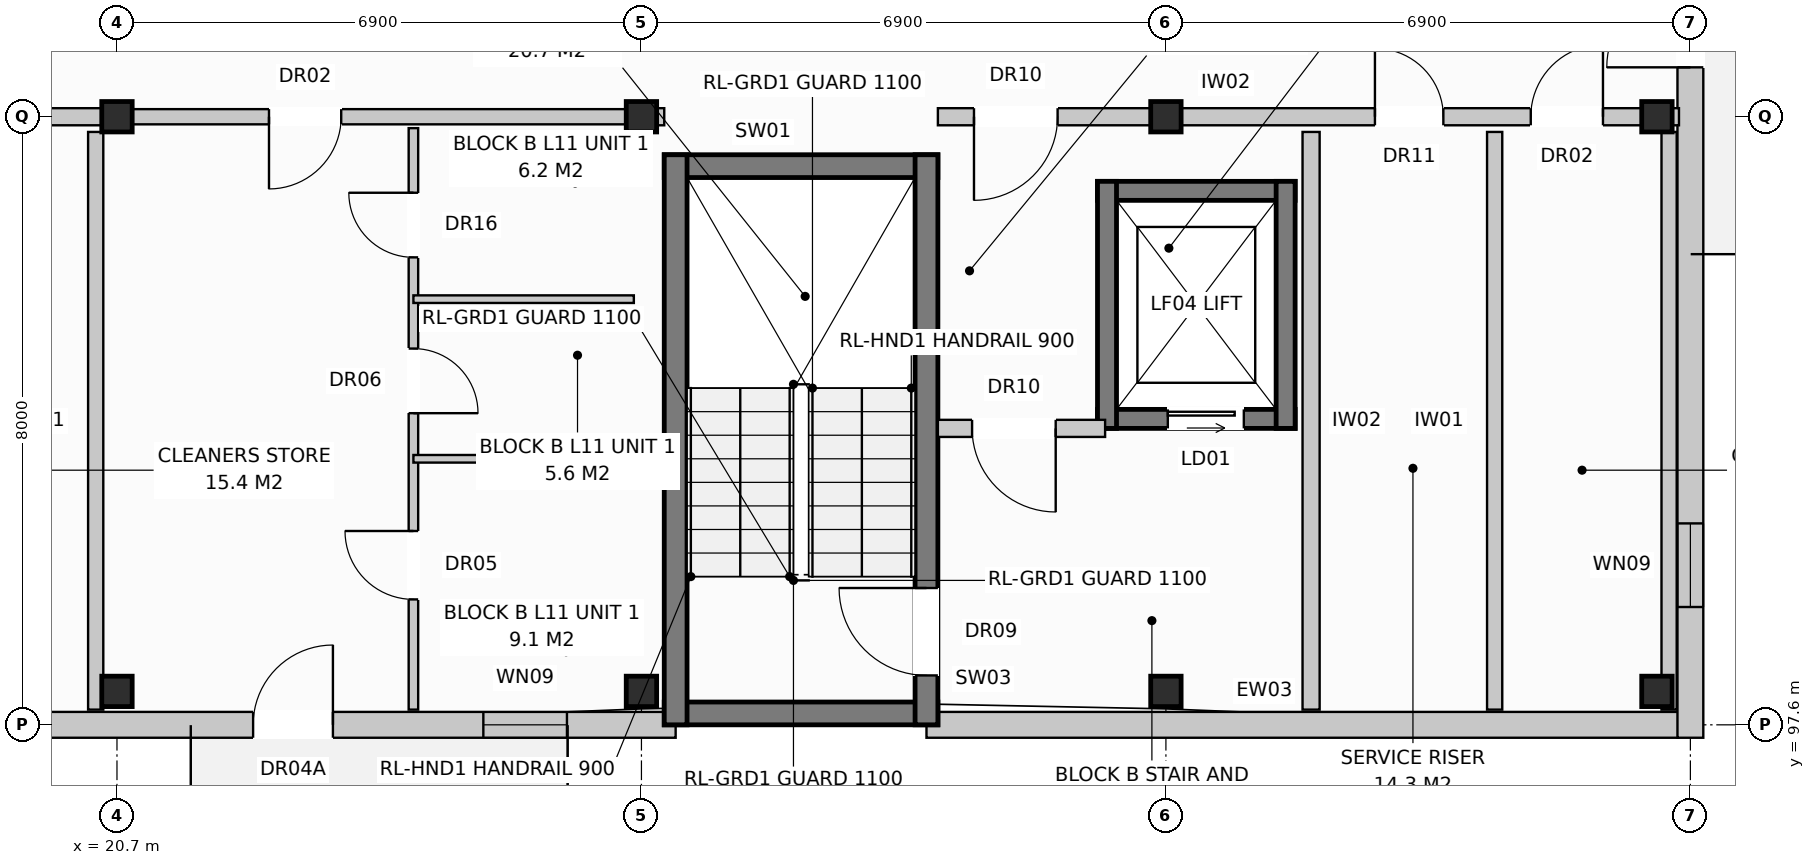
"""IFC4 building model, lengths in metres.
Left out: names, types, materials, properties, quantities, classifications, styles, units other than length and angle.
Written with IfcOpenShell. Run it as: python <this file> out.ifc"""

import sys

from ifc_helpers import new_model, si_unit, direction, frame, frame_2d, origin, origin_with_axes, origin_2d, place, context, subcontext, project, spatial, rectangle, extrude, element, fill, save


model = new_model("IFC4")
c1 = context("Model", 3, precision=1e-05, world=origin(), true_north=direction((0.0, 1.0)))
c2 = subcontext(c1, "Body", "Model", "MODEL_VIEW")
j1 = project(units=[si_unit("LENGTHUNIT", "METRE"), si_unit("PLANEANGLEUNIT", "RADIAN")], contexts=[c1])
p1 = place(None, origin())
s1 = spatial("IfcSite", under=j1, at=p1, CompositionType="ELEMENT")
p2 = place(p1, origin())
s2 = spatial("IfcBuilding", under=s1, at=p2, CompositionType="ELEMENT")
p3 = place(p2, frame((0.0, 0.0, 36.8)))
s3 = spatial("IfcBuildingStorey", under=s2, at=p3, CompositionType="ELEMENT", Elevation=36.8)
for number, where, z_axis, x_axis in (
    (1, (20.7, 98.04, 0.0), (0.0, 0.0, 1.0), (1.0, 0.0, 0.0)),
    (2, (20.7, 105.6, 0.0), (0.0, 0.0, 1.0), (1.0, 0.0, 0.0)),
    (3, (27.6, 98.04, 0.0), (0.0, 0.0, 1.0), (1.0, 0.0, 0.0)),
    (4, (27.6, 105.6, 0.0), (0.0, 0.0, 1.0), (1.0, 0.0, 0.0)),
    (5, (34.5, 98.04, 0.0), (0.0, 0.0, 1.0), (1.0, 0.0, 0.0)),
    (6, (34.5, 105.6, 0.0), (0.0, 0.0, 1.0), (1.0, 0.0, 0.0)),
    (7, (40.96, 98.04, 0.0), (0.0, 0.0, 1.0), (1.0, 0.0, 0.0)),
    (8, (40.96, 105.6, 0.0), (0.0, 0.0, 1.0), (1.0, 0.0, 0.0)),
):
    element("IfcColumn", number, at=place(p3, frame(where, z_axis=z_axis, x_axis=x_axis)), inside=s3, PredefinedType="COLUMN", context=c2, shape_type="SweptSolid", body=[
        extrude(rectangle(XDim=0.4, YDim=0.4, at=origin_2d()), origin(), (0.0, 0.0, 1.0), 3.2),
    ])
p4 = place(p3, frame((10.65, 97.6, 0.0), z_axis=(0.0, 0.0, 1.0), x_axis=(1.0, 0.0, 0.0)))
e9 = element("IfcWall", 9, at=p4, inside=s3, PredefinedType="STANDARD", context=c2, shape_type="SweptSolid", body=[
    extrude(rectangle(XDim=17.4, YDim=0.34, at=frame_2d((8.7, 0.0))), origin(), (0.0, 0.0, 1.0), 2.97),
])
p5 = place(p4, frame((11.841, 0.0, 0.0)))
e10 = element("IfcOpeningElement", 10, at=p5, cuts=e9, PredefinedType="OPENING", context=c2, shape_type="SweptSolid", body=[
    extrude(rectangle(XDim=1.05, YDim=2.12, at=frame_2d((0.525, 1.06))), frame((0.0, 0.182, 0.0), z_axis=(0.0, -1.0, 0.0), x_axis=(1.0, 0.0, 0.0)), (0.0, 0.0, 1.0), 0.364),
])
p6 = place(p4, frame((14.87, 0.0, 0.72)))
e11 = element("IfcOpeningElement", 11, at=p6, cuts=e9, PredefinedType="OPENING", context=c2, shape_type="SweptSolid", body=[
    extrude(rectangle(XDim=1.1, YDim=1.5, at=frame_2d((0.55, 0.75))), frame((0.0, 0.182, 0.0), z_axis=(0.0, -1.0, 0.0), x_axis=(1.0, 0.0, 0.0)), (0.0, 0.0, 1.0), 0.364),
])
p7 = place(p3, frame((31.35, 97.6, 0.0), z_axis=(0.0, 0.0, 1.0), x_axis=(1.0, 0.0, 0.0)))
e12 = element("IfcWall", 12, at=p7, inside=s3, PredefinedType="STANDARD", context=c2, shape_type="SweptSolid", body=[
    extrude(rectangle(XDim=9.89, YDim=0.34, at=frame_2d((4.945, 0.0))), origin(), (0.0, 0.0, 1.0), 2.97),
])
p8 = place(p3, frame((41.4, 97.43, 0.0), z_axis=(0.0, 0.0, 1.0), x_axis=(0.0, 1.0, 0.0)))
e13 = element("IfcWall", 13, at=p8, inside=s3, PredefinedType="STANDARD", context=c2, shape_type="SweptSolid", body=[
    extrude(rectangle(XDim=18.74, YDim=0.34, at=frame_2d((9.37, 0.0))), origin(), (0.0, 0.0, 1.0), 2.97),
])
p9 = place(p8, frame((8.82, 0.0, 0.0)))
e14 = element("IfcOpeningElement", 14, at=p9, cuts=e13, PredefinedType="OPENING", context=c2, shape_type="SweptSolid", body=[
    extrude(rectangle(XDim=1.1, YDim=2.1, at=frame_2d((0.55, 1.05))), frame((0.0, 0.182, 0.0), z_axis=(0.0, -1.0, 0.0), x_axis=(1.0, 0.0, 0.0)), (0.0, 0.0, 1.0), 0.364),
])
p10 = place(p8, frame((1.72, 0.0, 0.72)))
e15 = element("IfcOpeningElement", 15, at=p10, cuts=e13, PredefinedType="OPENING", context=c2, shape_type="SweptSolid", body=[
    extrude(rectangle(XDim=1.1, YDim=1.5, at=frame_2d((0.55, 0.75))), frame((0.0, 0.182, 0.0), z_axis=(0.0, -1.0, 0.0), x_axis=(1.0, 0.0, 0.0)), (0.0, 0.0, 1.0), 0.364),
])
p11 = place(p8, frame((15.92, 0.0, 0.72)))
e16 = element("IfcOpeningElement", 16, at=p11, cuts=e13, PredefinedType="OPENING", context=c2, shape_type="SweptSolid", body=[
    extrude(rectangle(XDim=1.1, YDim=1.5, at=frame_2d((0.55, 0.75))), frame((0.0, 0.182, 0.0), z_axis=(0.0, -1.0, 0.0), x_axis=(1.0, 0.0, 0.0)), (0.0, 0.0, 1.0), 0.364),
])
p12 = place(p3, frame((20.42, 97.8, 0.0), z_axis=(0.0, 0.0, 1.0), x_axis=(0.0, 1.0, 0.0)))
e17 = element("IfcWall", 17, at=p12, inside=s3, PredefinedType="PARTITIONING", context=c2, shape_type="SweptSolid", body=[
    extrude(rectangle(XDim=7.6, YDim=0.2, at=frame_2d((3.8, 0.0))), origin(), (0.0, 0.0, 1.0), 2.97),
])
p13 = place(p3, frame((10.8, 105.6, 0.0), z_axis=(0.0, 0.0, 1.0), x_axis=(1.0, 0.0, 0.0)))
e18 = element("IfcWall", 18, at=p13, inside=s3, PredefinedType="PARTITIONING", context=c2, shape_type="SweptSolid", body=[
    extrude(rectangle(XDim=9.9, YDim=0.225, at=frame_2d((4.95, 0.0))), origin(), (0.0, 0.0, 1.0), 2.41),
])
p14 = place(p13, frame((0.475, 0.0, 0.0)))
e19 = element("IfcOpeningElement", 19, at=p14, cuts=e18, PredefinedType="OPENING", context=c2, shape_type="SweptSolid", body=[
    extrude(rectangle(XDim=1.1, YDim=2.15, at=frame_2d((0.55, 1.075))), frame((0.0, 0.125, 0.0), z_axis=(0.0, -1.0, 0.0), x_axis=(1.0, 0.0, 0.0)), (0.0, 0.0, 1.0), 0.249),
])
p15 = place(p13, frame((5.75, 0.0, 0.0)))
e20 = element("IfcOpeningElement", 20, at=p15, cuts=e18, PredefinedType="OPENING", context=c2, shape_type="SweptSolid", body=[
    extrude(rectangle(XDim=0.9, YDim=2.1, at=frame_2d((0.45, 1.05))), frame((0.0, 0.125, 0.0), z_axis=(0.0, -1.0, 0.0), x_axis=(1.0, 0.0, 0.0)), (0.0, 0.0, 1.0), 0.249),
])
p16 = place(p13, frame((7.8, 0.0, 0.0)))
e21 = element("IfcOpeningElement", 21, at=p16, cuts=e18, PredefinedType="OPENING", context=c2, shape_type="SweptSolid", body=[
    extrude(rectangle(XDim=0.95, YDim=2.15, at=frame_2d((0.475, 1.075))), frame((0.0, 0.125, 0.0), z_axis=(0.0, -1.0, 0.0), x_axis=(1.0, 0.0, 0.0)), (0.0, 0.0, 1.0), 0.249),
])
for number, where, z_axis, x_axis in (
    (22, (27.9, 97.75, 0.0), (0.0, 0.0, 1.0), (1.0, 0.0, 0.0)),
    (23, (27.9, 104.95, 0.0), (0.0, 0.0, 1.0), (1.0, 0.0, 0.0)),
):
    element("IfcWall", number, at=place(p3, frame(where, z_axis=z_axis, x_axis=x_axis)), inside=s3, PredefinedType="SHEAR", context=c2, shape_type="SweptSolid", body=[
        extrude(rectangle(XDim=3.6, YDim=0.3, at=frame_2d((1.8, 0.0))), origin(), (0.0, 0.0, 1.0), 2.97),
    ])
p17 = place(p3, frame((28.05, 97.6, 0.0), z_axis=(0.0, 0.0, 1.0), x_axis=(0.0, 1.0, 0.0)))
e24 = element("IfcWall", 24, at=p17, inside=s3, PredefinedType="SHEAR", context=c2, shape_type="SweptSolid", body=[
    extrude(rectangle(XDim=7.5, YDim=0.3, at=frame_2d((3.75, 0.0))), origin(), (0.0, 0.0, 1.0), 2.97),
])
p18 = place(p3, frame((31.35, 97.6, 0.0), z_axis=(0.0, 0.0, 1.0), x_axis=(0.0, 1.0, 0.0)))
e25 = element("IfcWall", 25, at=p18, inside=s3, PredefinedType="SHEAR", context=c2, shape_type="SweptSolid", body=[
    extrude(rectangle(XDim=7.5, YDim=0.3, at=frame_2d((3.75, 0.0))), origin(), (0.0, 0.0, 1.0), 2.97),
])
p19 = place(p18, frame((0.65, 0.0, 0.0)))
e26 = element("IfcOpeningElement", 26, at=p19, cuts=e25, PredefinedType="OPENING", context=c2, shape_type="SweptSolid", body=[
    extrude(rectangle(XDim=1.15, YDim=2.15, at=frame_2d((0.575, 1.075))), frame((0.0, 0.162, 0.0), z_axis=(0.0, -1.0, 0.0), x_axis=(1.0, 0.0, 0.0)), (0.0, 0.0, 1.0), 0.324),
])
p20 = place(p3, frame((33.6, 101.625, 0.0), z_axis=(0.0, 0.0, 1.0), x_axis=(1.0, 0.0, 0.0)))
e27 = element("IfcWall", 27, at=p20, inside=s3, PredefinedType="SHEAR", context=c2, shape_type="SweptSolid", body=[
    extrude(rectangle(XDim=2.6, YDim=0.25, at=frame_2d((1.3, 0.0))), origin(), (0.0, 0.0, 1.0), 2.97),
])
p21 = place(p20, frame((0.925, 0.0, 0.0)))
e28 = element("IfcOpeningElement", 28, at=p21, cuts=e27, PredefinedType="OPENING", context=c2, shape_type="SweptSolid", body=[
    extrude(rectangle(XDim=1.0, YDim=2.1, at=frame_2d((0.5, 1.05))), frame((0.0, 0.137, 0.0), z_axis=(0.0, -1.0, 0.0), x_axis=(1.0, 0.0, 0.0)), (0.0, 0.0, 1.0), 0.274),
])
p22 = place(p3, frame((33.6, 104.625, 0.0), z_axis=(0.0, 0.0, 1.0), x_axis=(1.0, 0.0, 0.0)))
e29 = element("IfcWall", 29, at=p22, inside=s3, PredefinedType="SHEAR", context=c2, shape_type="SweptSolid", body=[
    extrude(rectangle(XDim=2.6, YDim=0.25, at=frame_2d((1.3, 0.0))), origin(), (0.0, 0.0, 1.0), 2.97),
])
for number, where, z_axis, x_axis in (
    (30, (33.725, 101.5, 0.0), (0.0, 0.0, 1.0), (0.0, 1.0, 0.0)),
    (31, (36.075, 101.5, 0.0), (0.0, 0.0, 1.0), (0.0, 1.0, 0.0)),
):
    element("IfcWall", number, at=place(p3, frame(where, z_axis=z_axis, x_axis=x_axis)), inside=s3, PredefinedType="SHEAR", context=c2, shape_type="SweptSolid", body=[
        extrude(rectangle(XDim=3.25, YDim=0.25, at=frame_2d((1.625, 0.0))), origin(), (0.0, 0.0, 1.0), 2.97),
    ])
p23 = place(p3, frame((36.41, 97.8, 0.0), z_axis=(0.0, 0.0, 1.0), x_axis=(0.0, 1.0, 0.0)))
e32 = element("IfcWall", 32, at=p23, inside=s3, PredefinedType="PARTITIONING", context=c2, shape_type="SweptSolid", body=[
    extrude(rectangle(XDim=7.6, YDim=0.225, at=frame_2d((3.8, 0.0))), origin(), (0.0, 0.0, 1.0), 2.97),
])
p24 = place(p3, frame((31.5, 101.5, 0.0), z_axis=(0.0, 0.0, 1.0), x_axis=(1.0, 0.0, 0.0)))
e33 = element("IfcWall", 33, at=p24, inside=s3, PredefinedType="PARTITIONING", context=c2, shape_type="SweptSolid", body=[
    extrude(rectangle(XDim=2.2, YDim=0.225, at=frame_2d((1.1, 0.0))), origin(), (0.0, 0.0, 1.0), 2.97),
])
p25 = place(p24, frame((0.45, 0.0, 0.0)))
e34 = element("IfcOpeningElement", 34, at=p25, cuts=e33, PredefinedType="OPENING", context=c2, shape_type="SweptSolid", body=[
    extrude(rectangle(XDim=1.1, YDim=2.15, at=frame_2d((0.55, 1.075))), frame((0.0, 0.125, 0.0), z_axis=(0.0, -1.0, 0.0), x_axis=(1.0, 0.0, 0.0)), (0.0, 0.0, 1.0), 0.249),
])
p26 = place(p3, frame((27.6, 105.6, 0.0), z_axis=(0.0, 0.0, 1.0), x_axis=(1.0, 0.0, 0.0)))
e35 = element("IfcWall", 35, at=p26, inside=s3, PredefinedType="PARTITIONING", context=c2, shape_type="SweptSolid", body=[
    extrude(rectangle(XDim=0.3, YDim=0.225, at=frame_2d((0.15, 0.0))), origin(), (0.0, 0.0, 1.0), 2.97),
])
p27 = place(p3, frame((38.825, 97.8, 0.0), z_axis=(0.0, 0.0, 1.0), x_axis=(0.0, 1.0, 0.0)))
e36 = element("IfcWall", 36, at=p27, inside=s3, PredefinedType="PARTITIONING", context=c2, shape_type="SweptSolid", body=[
    extrude(rectangle(XDim=7.6, YDim=0.2, at=frame_2d((3.8, 0.0))), origin(), (0.0, 0.0, 1.0), 2.97),
])
p28 = place(p3, frame((41.12, 97.8, 0.0), z_axis=(0.0, 0.0, 1.0), x_axis=(0.0, 1.0, 0.0)))
e37 = element("IfcWall", 37, at=p28, inside=s3, PredefinedType="PARTITIONING", context=c2, shape_type="SweptSolid", body=[
    extrude(rectangle(XDim=7.6, YDim=0.2, at=frame_2d((3.8, 0.0))), origin(), (0.0, 0.0, 1.0), 2.41),
])
p29 = place(p3, frame((31.5, 105.6, 0.0), z_axis=(0.0, 0.0, 1.0), x_axis=(1.0, 0.0, 0.0)))
e38 = element("IfcWall", 38, at=p29, inside=s3, PredefinedType="PARTITIONING", context=c2, shape_type="SweptSolid", body=[
    extrude(rectangle(XDim=9.75, YDim=0.225, at=frame_2d((4.875, 0.0))), origin(), (0.0, 0.0, 1.0), 2.41),
])
p30 = place(p29, frame((0.475, 0.0, 0.0)))
e39 = element("IfcOpeningElement", 39, at=p30, cuts=e38, PredefinedType="OPENING", context=c2, shape_type="SweptSolid", body=[
    extrude(rectangle(XDim=1.1, YDim=2.15, at=frame_2d((0.55, 1.075))), frame((0.0, 0.125, 0.0), z_axis=(0.0, -1.0, 0.0), x_axis=(1.0, 0.0, 0.0)), (0.0, 0.0, 1.0), 0.249),
])
p31 = place(p29, frame((5.75, 0.0, 0.0)))
e40 = element("IfcOpeningElement", 40, at=p31, cuts=e38, PredefinedType="OPENING", context=c2, shape_type="SweptSolid", body=[
    extrude(rectangle(XDim=0.9, YDim=2.1, at=frame_2d((0.45, 1.05))), frame((0.0, 0.125, 0.0), z_axis=(0.0, -1.0, 0.0), x_axis=(1.0, 0.0, 0.0)), (0.0, 0.0, 1.0), 0.249),
])
p32 = place(p29, frame((7.8, 0.0, 0.0)))
e41 = element("IfcOpeningElement", 41, at=p32, cuts=e38, PredefinedType="OPENING", context=c2, shape_type="SweptSolid", body=[
    extrude(rectangle(XDim=0.95, YDim=2.15, at=frame_2d((0.475, 1.075))), frame((0.0, 0.125, 0.0), z_axis=(0.0, -1.0, 0.0), x_axis=(1.0, 0.0, 0.0)), (0.0, 0.0, 1.0), 0.249),
])
p33 = place(p3, frame((20.7, 105.6, 0.0), z_axis=(0.0, 0.0, 1.0), x_axis=(1.0, 0.0, 0.0)))
e42 = element("IfcWall", 42, at=p33, inside=s3, PredefinedType="PARTITIONING", context=c2, shape_type="SweptSolid", body=[
    extrude(rectangle(XDim=6.9, YDim=0.2, at=frame_2d((3.45, 0.0))), origin(), (0.0, 0.0, 1.0), 2.41),
])
p34 = place(p33, frame((2.0, 0.0, 0.0)))
e43 = element("IfcOpeningElement", 43, at=p34, cuts=e42, PredefinedType="OPENING", context=c2, shape_type="SweptSolid", body=[
    extrude(rectangle(XDim=0.95, YDim=2.15, at=frame_2d((0.475, 1.075))), frame((0.0, 0.112, 0.0), z_axis=(0.0, -1.0, 0.0), x_axis=(1.0, 0.0, 0.0)), (0.0, 0.0, 1.0), 0.224),
])
p35 = place(p3, frame((24.6, 105.45, 0.0), z_axis=(0.0, 0.0, 1.0), x_axis=(0.0, -1.0, 0.0)))
e44 = element("IfcWall", 44, at=p35, inside=s3, PredefinedType="PARTITIONING", context=c2, shape_type="SweptSolid", body=[
    extrude(rectangle(XDim=7.65, YDim=0.125, at=frame_2d((3.825, 0.0))), origin(), (0.0, 0.0, 1.0), 2.97),
])
p36 = place(p35, frame((0.85, 0.0, 0.0)))
e45 = element("IfcOpeningElement", 45, at=p36, cuts=e44, PredefinedType="OPENING", context=c2, shape_type="SweptSolid", body=[
    extrude(rectangle(XDim=0.85, YDim=2.1, at=frame_2d((0.425, 1.05))), frame((0.0, 0.074, 0.0), z_axis=(0.0, -1.0, 0.0), x_axis=(1.0, 0.0, 0.0)), (0.0, 0.0, 1.0), 0.149),
])
p37 = place(p35, frame((2.9, 0.0, 0.0)))
e46 = element("IfcOpeningElement", 46, at=p37, cuts=e44, PredefinedType="OPENING", context=c2, shape_type="SweptSolid", body=[
    extrude(rectangle(XDim=0.85, YDim=2.05, at=frame_2d((0.425, 1.025))), frame((0.0, 0.074, 0.0), z_axis=(0.0, -1.0, 0.0), x_axis=(1.0, 0.0, 0.0)), (0.0, 0.0, 1.0), 0.149),
])
p38 = place(p35, frame((5.3, 0.0, 0.0)))
e47 = element("IfcOpeningElement", 47, at=p38, cuts=e44, PredefinedType="OPENING", context=c2, shape_type="SweptSolid", body=[
    extrude(rectangle(XDim=0.9, YDim=2.1, at=frame_2d((0.45, 1.05))), frame((0.0, 0.074, 0.0), z_axis=(0.0, -1.0, 0.0), x_axis=(1.0, 0.0, 0.0)), (0.0, 0.0, 1.0), 0.149),
])
for number, where, z_axis, x_axis in (
    (48, (24.6, 103.2, 0.0), (0.0, 0.0, 1.0), (1.0, 0.0, 0.0)),
    (49, (24.6, 101.1, 0.0), (0.0, 0.0, 1.0), (1.0, 0.0, 0.0)),
):
    element("IfcWall", number, at=place(p3, frame(where, z_axis=z_axis, x_axis=x_axis)), inside=s3, PredefinedType="PARTITIONING", context=c2, shape_type="SweptSolid", body=[
        extrude(rectangle(XDim=2.9, YDim=0.1, at=frame_2d((1.45, 0.0))), origin(), (0.0, 0.0, 1.0), 2.97),
    ])
p39 = place(p5, origin_with_axes())
e50 = element("IfcDoor", 50, at=p39, inside=s3, OperationType="SINGLE_SWING_RIGHT", PredefinedType="DOOR", context=c2, shape_type="SweptSolid", body=[
    extrude(rectangle(XDim=1.05, YDim=2.12, at=frame_2d((0.525, 1.06))), frame((0.0, 0.025, 0.0), z_axis=(0.0, -1.0, 0.0), x_axis=(1.0, 0.0, 0.0)), (0.0, 0.0, 1.0), 0.05),
])
fill(e10, e50)
p40 = place(p6, origin_with_axes())
e51 = element("IfcWindow", 51, at=p40, inside=s3, PartitioningType="SINGLE_PANEL", PredefinedType="WINDOW", context=c2, shape_type="SweptSolid", body=[
    extrude(rectangle(XDim=1.1, YDim=1.5, at=frame_2d((0.55, 0.75))), frame((0.0, 0.03, 0.0), z_axis=(0.0, -1.0, 0.0), x_axis=(1.0, 0.0, 0.0)), (0.0, 0.0, 1.0), 0.06),
])
fill(e11, e51)
p41 = place(p9, origin_with_axes())
e52 = element("IfcDoor", 52, at=p41, inside=s3, OperationType="SINGLE_SWING_LEFT", PredefinedType="DOOR", context=c2, shape_type="SweptSolid", body=[
    extrude(rectangle(XDim=1.1, YDim=2.1, at=frame_2d((0.55, 1.05))), frame((0.0, 0.025, 0.0), z_axis=(0.0, -1.0, 0.0), x_axis=(1.0, 0.0, 0.0)), (0.0, 0.0, 1.0), 0.05),
])
fill(e14, e52)
p42 = place(p10, origin_with_axes())
e53 = element("IfcWindow", 53, at=p42, inside=s3, PartitioningType="SINGLE_PANEL", PredefinedType="WINDOW", context=c2, shape_type="SweptSolid", body=[
    extrude(rectangle(XDim=1.1, YDim=1.5, at=frame_2d((0.55, 0.75))), frame((0.0, 0.03, 0.0), z_axis=(0.0, -1.0, 0.0), x_axis=(1.0, 0.0, 0.0)), (0.0, 0.0, 1.0), 0.06),
])
fill(e15, e53)
p43 = place(p19, origin_with_axes())
e54 = element("IfcDoor", 54, at=p43, inside=s3, OperationType="SINGLE_SWING_RIGHT", PredefinedType="DOOR", context=c2, shape_type="SweptSolid", body=[
    extrude(rectangle(XDim=1.15, YDim=2.15, at=frame_2d((0.575, 1.075))), frame((0.0, 0.025, 0.0), z_axis=(0.0, -1.0, 0.0), x_axis=(1.0, 0.0, 0.0)), (0.0, 0.0, 1.0), 0.05),
])
fill(e26, e54)
p44 = place(p21, origin_with_axes())
e55 = element("IfcDoor", 55, at=p44, inside=s3, OperationType="SLIDING_TO_LEFT", PredefinedType="DOOR", context=c2, shape_type="SweptSolid", body=[
    extrude(rectangle(XDim=1.0, YDim=2.1, at=frame_2d((0.5, 1.05))), frame((0.0, 0.025, 0.0), z_axis=(0.0, -1.0, 0.0), x_axis=(1.0, 0.0, 0.0)), (0.0, 0.0, 1.0), 0.05),
])
fill(e28, e55)
p45 = place(p25, frame((1.1, 0.0, 0.0), z_axis=(0.0, 0.0, 1.0), x_axis=(-1.0, 0.0, 0.0)))
e56 = element("IfcDoor", 56, at=p45, inside=s3, OperationType="SINGLE_SWING_RIGHT", PredefinedType="DOOR", context=c2, shape_type="SweptSolid", body=[
    extrude(rectangle(XDim=1.1, YDim=2.15, at=frame_2d((0.55, 1.075))), frame((0.0, 0.025, 0.0), z_axis=(0.0, -1.0, 0.0), x_axis=(1.0, 0.0, 0.0)), (0.0, 0.0, 1.0), 0.05),
])
fill(e34, e56)
p46 = place(p30, frame((1.1, 0.0, 0.0), z_axis=(0.0, 0.0, 1.0), x_axis=(-1.0, 0.0, 0.0)))
e57 = element("IfcDoor", 57, at=p46, inside=s3, OperationType="SINGLE_SWING_LEFT", PredefinedType="DOOR", context=c2, shape_type="SweptSolid", body=[
    extrude(rectangle(XDim=1.1, YDim=2.15, at=frame_2d((0.55, 1.075))), frame((0.0, 0.025, 0.0), z_axis=(0.0, -1.0, 0.0), x_axis=(1.0, 0.0, 0.0)), (0.0, 0.0, 1.0), 0.05),
])
fill(e39, e57)
p47 = place(p31, origin_with_axes())
e58 = element("IfcDoor", 58, at=p47, inside=s3, OperationType="SINGLE_SWING_LEFT", PredefinedType="DOOR", context=c2, shape_type="SweptSolid", body=[
    extrude(rectangle(XDim=0.9, YDim=2.1, at=frame_2d((0.45, 1.05))), frame((0.0, 0.025, 0.0), z_axis=(0.0, -1.0, 0.0), x_axis=(1.0, 0.0, 0.0)), (0.0, 0.0, 1.0), 0.05),
])
fill(e40, e58)
p48 = place(p32, origin_with_axes())
e59 = element("IfcDoor", 59, at=p48, inside=s3, OperationType="SINGLE_SWING_RIGHT", PredefinedType="DOOR", context=c2, shape_type="SweptSolid", body=[
    extrude(rectangle(XDim=0.95, YDim=2.15, at=frame_2d((0.475, 1.075))), frame((0.0, 0.025, 0.0), z_axis=(0.0, -1.0, 0.0), x_axis=(1.0, 0.0, 0.0)), (0.0, 0.0, 1.0), 0.05),
])
fill(e41, e59)
p49 = place(p34, frame((0.95, 0.0, 0.0), z_axis=(0.0, 0.0, 1.0), x_axis=(-1.0, 0.0, 0.0)))
e60 = element("IfcDoor", 60, at=p49, inside=s3, OperationType="SINGLE_SWING_LEFT", PredefinedType="DOOR", context=c2, shape_type="SweptSolid", body=[
    extrude(rectangle(XDim=0.95, YDim=2.15, at=frame_2d((0.475, 1.075))), frame((0.0, 0.025, 0.0), z_axis=(0.0, -1.0, 0.0), x_axis=(1.0, 0.0, 0.0)), (0.0, 0.0, 1.0), 0.05),
])
fill(e43, e60)
p50 = place(p36, frame((0.85, 0.0, 0.0), z_axis=(0.0, 0.0, 1.0), x_axis=(-1.0, 0.0, 0.0)))
e61 = element("IfcDoor", 61, at=p50, inside=s3, OperationType="SINGLE_SWING_LEFT", PredefinedType="DOOR", context=c2, shape_type="SweptSolid", body=[
    extrude(rectangle(XDim=0.85, YDim=2.1, at=frame_2d((0.425, 1.05))), frame((0.0, 0.025, 0.0), z_axis=(0.0, -1.0, 0.0), x_axis=(1.0, 0.0, 0.0)), (0.0, 0.0, 1.0), 0.05),
])
fill(e45, e61)
p51 = place(p37, origin_with_axes())
e62 = element("IfcDoor", 62, at=p51, inside=s3, OperationType="SINGLE_SWING_RIGHT", PredefinedType="DOOR", context=c2, shape_type="SweptSolid", body=[
    extrude(rectangle(XDim=0.85, YDim=2.05, at=frame_2d((0.425, 1.025))), frame((0.0, 0.025, 0.0), z_axis=(0.0, -1.0, 0.0), x_axis=(1.0, 0.0, 0.0)), (0.0, 0.0, 1.0), 0.05),
])
fill(e46, e62)
p52 = place(p38, frame((0.9, 0.0, 0.0), z_axis=(0.0, 0.0, 1.0), x_axis=(-1.0, 0.0, 0.0)))
e63 = element("IfcDoor", 63, at=p52, inside=s3, OperationType="SINGLE_SWING_LEFT", PredefinedType="DOOR", context=c2, shape_type="SweptSolid", body=[
    extrude(rectangle(XDim=0.9, YDim=2.1, at=frame_2d((0.45, 1.05))), frame((0.0, 0.025, 0.0), z_axis=(0.0, -1.0, 0.0), x_axis=(1.0, 0.0, 0.0)), (0.0, 0.0, 1.0), 0.05),
])
fill(e47, e63)
save(model, sys.argv[1])
